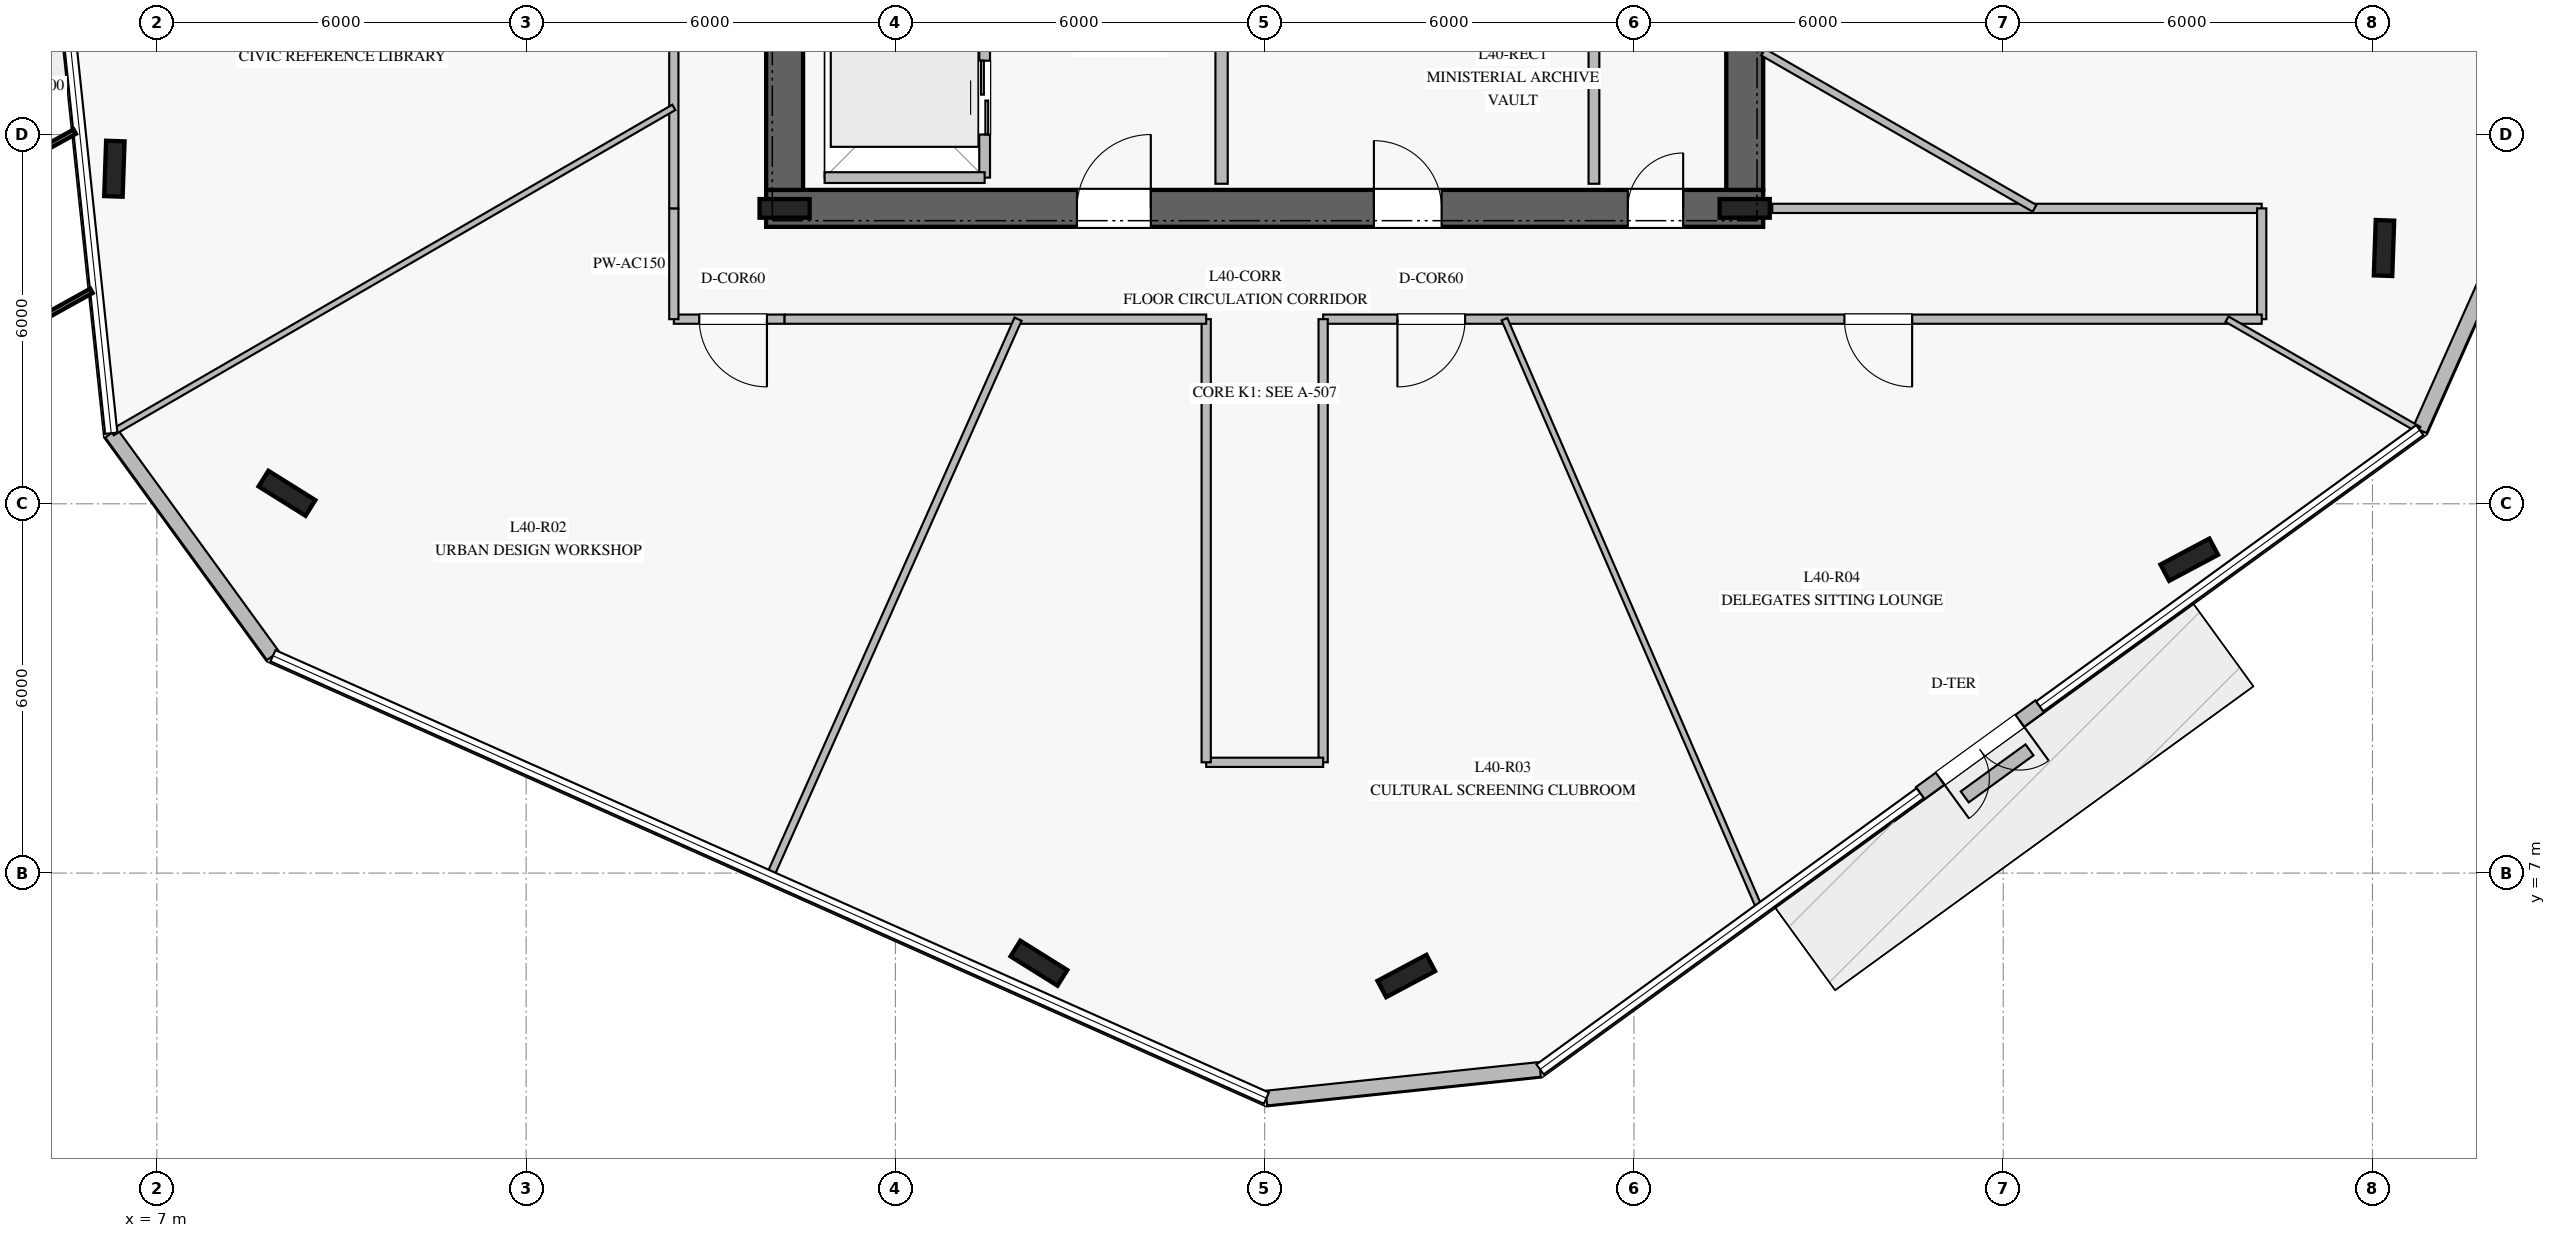
"""IFC4 building model, lengths in metres.
Left out: names, types, materials, properties, quantities, classifications, styles, units other than length and angle.
Written with IfcOpenShell. Run it as: python <this file> out.ifc"""

import sys

from ifc_helpers import new_model, si_unit, direction, frame, frame_2d, origin, origin_2d, place, context, subcontext, project, spatial, rectangle, i_section, extrude, element, fill, save


model = new_model("IFC4")
c1 = context("Model", 3, precision=1e-05, world=origin(), true_north=direction((0.0, 1.0)))
c2 = subcontext(c1, "Body", "Model", "MODEL_VIEW")
j1 = project(units=[si_unit("LENGTHUNIT", "METRE"), si_unit("PLANEANGLEUNIT", "RADIAN")], contexts=[c1])
p1 = place(None, origin())
s1 = spatial("IfcSite", under=j1, at=p1, CompositionType="ELEMENT")
p2 = place(p1, origin())
s2 = spatial("IfcBuilding", under=s1, at=p2, CompositionType="ELEMENT")
p3 = place(p2, frame((0.0, 0.0, 166.4)))
s3 = spatial("IfcBuildingStorey", under=s2, at=p3, CompositionType="ELEMENT", Elevation=166.4)
p4 = place(p3, frame((16.9, 17.8, 0.0), z_axis=(0.0, 0.0, 1.0), x_axis=(1.0, 0.0, 0.0)))
e1 = element("IfcWall", 1, at=p4, inside=s3, PredefinedType="SHEAR", context=c2, shape_type="SweptSolid", body=[
    extrude(rectangle(XDim=16.2, YDim=0.6, at=frame_2d((8.1, 0.0))), origin(), (0.0, 0.0, 1.0), 3.7),
])
p5 = place(p4, frame((5.05, 0.0, 0.0)))
e2 = element("IfcOpeningElement", 2, at=p5, cuts=e1, PredefinedType="OPENING", context=c2, shape_type="SweptSolid", body=[
    extrude(rectangle(XDim=1.2, YDim=2.25, at=frame_2d((0.6, 1.125))), frame((0.0, 0.31, 0.0), z_axis=(0.0, -1.0, 0.0), x_axis=(1.0, 0.0, 0.0)), (0.0, 0.0, 1.0), 0.62),
])
p6 = place(p4, frame((14.0, 0.0, 0.0)))
e3 = element("IfcOpeningElement", 3, at=p6, cuts=e1, PredefinedType="OPENING", context=c2, shape_type="SweptSolid", body=[
    extrude(rectangle(XDim=0.9, YDim=2.1, at=frame_2d((0.45, 1.05))), frame((0.0, 0.31, 0.0), z_axis=(0.0, -1.0, 0.0), x_axis=(1.0, 0.0, 0.0)), (0.0, 0.0, 1.0), 0.62),
])
p7 = place(p4, frame((9.875, 0.0, 0.0)))
e4 = element("IfcOpeningElement", 4, at=p7, cuts=e1, PredefinedType="OPENING", context=c2, shape_type="SweptSolid", body=[
    extrude(rectangle(XDim=1.1, YDim=2.2, at=frame_2d((0.55, 1.1))), frame((0.0, 0.31, 0.0), z_axis=(0.0, -1.0, 0.0), x_axis=(1.0, 0.0, 0.0)), (0.0, 0.0, 1.0), 0.62),
])
p8 = place(p3, frame((17.2, 31.9, 0.0), z_axis=(0.0, 0.0, 1.0), x_axis=(0.0, -1.0, 0.0)))
e5 = element("IfcWall", 5, at=p8, inside=s3, PredefinedType="SHEAR", context=c2, shape_type="SweptSolid", body=[
    extrude(rectangle(XDim=13.8, YDim=0.6, at=frame_2d((6.9, 0.0))), origin(), (0.0, 0.0, 1.0), 3.7),
])
p9 = place(p8, frame((2.05, 0.0, 0.0)))
e6 = element("IfcOpeningElement", 6, at=p9, cuts=e5, PredefinedType="OPENING", context=c2, shape_type="SweptSolid", body=[
    extrude(rectangle(XDim=1.5, YDim=2.2, at=frame_2d((0.75, 1.1))), frame((0.0, 0.31, 0.0), z_axis=(0.0, -1.0, 0.0), x_axis=(1.0, 0.0, 0.0)), (0.0, 0.0, 1.0), 0.62),
])
p10 = place(p3, frame((32.8, 18.1, 0.0), z_axis=(0.0, 0.0, 1.0), x_axis=(0.0, 1.0, 0.0)))
e7 = element("IfcWall", 7, at=p10, inside=s3, PredefinedType="SHEAR", context=c2, shape_type="SweptSolid", body=[
    extrude(rectangle(XDim=13.8, YDim=0.6, at=frame_2d((6.9, 0.0))), origin(), (0.0, 0.0, 1.0), 3.7),
])
for number, where, z_axis, x_axis in (
    (8, (17.2, 17.8, 0.0), (0.0, 0.0, 1.0), (1.0, 0.0, 0.0)),
    (9, (32.8, 17.8, 0.0), (0.0, 0.0, 1.0), (1.0, 0.0, 0.0)),
):
    element("IfcColumn", number, at=place(p3, frame(where, z_axis=z_axis, x_axis=x_axis)), inside=s3, PredefinedType="COLUMN", context=c2, shape_type="SweptSolid", body=[
        extrude(i_section(OverallWidth=0.303, OverallDepth=0.814, WebThickness=0.021, FlangeThickness=0.04, at=origin_2d()), origin(), (0.0, 0.0, 1.0), 4.0),
    ])
for number, where, z_axis, x_axis in (
    (10, (6.31, 18.444, 0.0), (0.0, 0.0, 1.0), (0.035, 0.999, 0.0)),
    (11, (9.114, 13.171, 0.0), (0.0, 0.0, 1.0), (-0.848, 0.53, 0.0)),
    (12, (21.332, 5.536, 0.0), (0.0, 0.0, 1.0), (-0.848, 0.53, 0.0)),
    (13, (27.301, 5.328, 0.0), (0.0, 0.0, 1.0), (0.883, 0.469, 0.0)),
    (14, (40.023, 12.092, 0.0), (0.0, 0.0, 1.0), (0.883, 0.469, 0.0)),
    (15, (43.187, 17.156, 0.0), (0.0, 0.0, 1.0), (0.035, 0.999, 0.0)),
):
    element("IfcColumn", number, at=place(p3, frame(where, z_axis=z_axis, x_axis=x_axis)), inside=s3, PredefinedType="COLUMN", context=c2, shape_type="SweptSolid", body=[
        extrude(i_section(OverallWidth=0.3, OverallDepth=0.9, WebThickness=0.019, FlangeThickness=0.035, at=origin_2d()), origin(), (0.0, 0.0, 1.0), 4.0),
    ])
p11 = place(p3, frame((6.259, 14.147, 0.0), z_axis=(0.0, 0.0, 1.0), x_axis=(0.587898873753, -0.80893443136, 0.0)))
e16 = element("IfcWall", 16, at=p11, inside=s3, PredefinedType="STANDARD", context=c2, shape_type="SweptSolid", body=[
    extrude(rectangle(XDim=4.47, YDim=0.24, at=frame_2d((2.235, 0.0))), origin(), (0.0, 0.0, 1.0), 3.7),
])
p12 = place(p3, frame((25.028, 3.344, 0.0), z_axis=(0.0, 0.0, 1.0), x_axis=(0.994530256506, 0.104448881729, 0.0)))
e17 = element("IfcWall", 17, at=p12, inside=s3, PredefinedType="STANDARD", context=c2, shape_type="SweptSolid", body=[
    extrude(rectangle(XDim=4.471, YDim=0.24, at=frame_2d((2.236, 0.0))), origin(), (0.0, 0.0, 1.0), 3.7),
])
p13 = place(p3, frame((35.651, 8.299, 0.0), z_axis=(0.0, 0.0, 1.0), x_axis=(0.809241672901, 0.587475884476, 0.0)))
e18 = element("IfcWall", 18, at=p13, inside=s3, PredefinedType="STANDARD", context=c2, shape_type="SweptSolid", body=[
    extrude(rectangle(XDim=2.4, YDim=0.24, at=frame_2d((1.2, 0.0))), origin(), (0.0, 0.0, 1.0), 3.7),
])
p14 = place(p13, frame((0.4, 0.0, 0.0)))
e19 = element("IfcOpeningElement", 19, at=p14, cuts=e18, PredefinedType="OPENING", context=c2, shape_type="SweptSolid", body=[
    extrude(rectangle(XDim=1.6, YDim=2.25, at=frame_2d((0.8, 1.125))), frame((0.0, 0.13, 0.0), z_axis=(0.0, -1.0, 0.0), x_axis=(1.0, 0.0, 0.0)), (0.0, 0.0, 1.0), 0.26),
])
p15 = place(p3, frame((43.769, 14.197, 0.0), z_axis=(0.0, 0.0, 1.0), x_axis=(0.406655262741, 0.913581686159, 0.0)))
e20 = element("IfcWall", 20, at=p15, inside=s3, PredefinedType="STANDARD", context=c2, shape_type="SweptSolid", body=[
    extrude(rectangle(XDim=4.47, YDim=0.24, at=frame_2d((2.235, 0.0))), origin(), (0.0, 0.0, 1.0), 3.7),
])
p16 = place(p3, frame((36.375, 8.238, 0.0), z_axis=(0.0, 0.0, 1.0), x_axis=(0.809166251076, 0.587579763197, 0.0)))
e21 = element("IfcWall", 21, at=p16, inside=s3, PredefinedType="USERDEFINED", context=c2, shape_type="SweptSolid", body=[
    extrude(rectangle(XDim=1.3, YDim=0.22, at=frame_2d((0.65, 0.0))), origin(), (0.0, 0.0, 1.0), 0.4),
])
p17 = place(p3, frame((24.3, 18.2, 0.0), z_axis=(0.0, 0.0, 1.0), x_axis=(0.0, 1.0, 0.0)))
e22 = element("IfcWall", 22, at=p17, inside=s3, PredefinedType="PARTITIONING", context=c2, shape_type="SweptSolid", body=[
    extrude(rectangle(XDim=5.15, YDim=0.2, at=frame_2d((2.575, 0.0))), origin(), (0.0, 0.0, 1.0), 3.7),
])
p18 = place(p3, frame((30.35, 18.2, 0.0), z_axis=(0.0, 0.0, 1.0), x_axis=(0.0, 1.0, 0.0)))
e23 = element("IfcWall", 23, at=p18, inside=s3, PredefinedType="PARTITIONING", context=c2, shape_type="SweptSolid", body=[
    extrude(rectangle(XDim=3.48, YDim=0.175, at=frame_2d((1.74, 0.0))), origin(), (0.0, 0.0, 1.0), 3.7),
])
p19 = place(p3, frame((20.45, 18.3, 0.0), z_axis=(0.0, 0.0, 1.0), x_axis=(0.0, 1.0, 0.0)))
e24 = element("IfcWall", 24, at=p19, inside=s3, PredefinedType="PARTITIONING", context=c2, shape_type="SweptSolid", body=[
    extrude(rectangle(XDim=2.6, YDim=0.175, at=frame_2d((1.3, 0.0))), origin(), (0.0, 0.0, 1.0), 3.7),
])
p20 = place(p19, frame((0.7, 0.0, 0.0)))
e25 = element("IfcOpeningElement", 25, at=p20, cuts=e24, PredefinedType="OPENING", context=c2, shape_type="SweptSolid", body=[
    extrude(rectangle(XDim=1.2, YDim=2.2, at=frame_2d((0.6, 1.1))), frame((0.0, 0.098, 0.0), z_axis=(0.0, -1.0, 0.0), x_axis=(1.0, 0.0, 0.0)), (0.0, 0.0, 1.0), 0.195),
])
p21 = place(p3, frame((17.85, 18.3, 0.0), z_axis=(0.0, 0.0, 1.0), x_axis=(1.0, 0.0, 0.0)))
e26 = element("IfcWall", 26, at=p21, inside=s3, PredefinedType="PARTITIONING", context=c2, shape_type="SweptSolid", body=[
    extrude(rectangle(XDim=2.6, YDim=0.175, at=frame_2d((1.3, 0.0))), origin(), (0.0, 0.0, 1.0), 3.7),
])
p22 = place(p3, frame((17.2, 16.0, 0.0), z_axis=(0.0, 0.0, 1.0), x_axis=(-1.0, 0.0, 0.0)))
e27 = element("IfcWall", 27, at=p22, inside=s3, PredefinedType="PARTITIONING", context=c2, shape_type="SweptSolid", body=[
    extrude(rectangle(XDim=1.8, YDim=0.15, at=frame_2d((0.9, 0.0))), origin(), (0.0, 0.0, 1.0), 3.3),
])
p23 = place(p22, frame((0.287, 0.0, 0.0)))
e28 = element("IfcOpeningElement", 28, at=p23, cuts=e27, PredefinedType="OPENING", context=c2, shape_type="SweptSolid", body=[
    extrude(rectangle(XDim=1.1, YDim=2.2, at=frame_2d((0.55, 1.1))), frame((0.0, 0.085, 0.0), z_axis=(0.0, -1.0, 0.0), x_axis=(1.0, 0.0, 0.0)), (0.0, 0.0, 1.0), 0.17),
])
p24 = place(p3, frame((15.4, 16.0, 0.0), z_axis=(0.0, 0.0, 1.0), x_axis=(0.0, 1.0, 0.0)))
e29 = element("IfcWall", 29, at=p24, inside=s3, PredefinedType="PARTITIONING", context=c2, shape_type="SweptSolid", body=[
    extrude(rectangle(XDim=1.8, YDim=0.15, at=frame_2d((0.9, 0.0))), origin(), (0.0, 0.0, 1.0), 3.15),
])
p25 = place(p3, frame((15.4, 17.8, 0.0), z_axis=(0.0, 0.0, 1.0), x_axis=(0.0, 1.0, 0.0)))
e30 = element("IfcWall", 30, at=p25, inside=s3, PredefinedType="PARTITIONING", context=c2, shape_type="SweptSolid", body=[
    extrude(rectangle(XDim=6.25, YDim=0.15, at=frame_2d((3.125, 0.0))), origin(), (0.0, 0.0, 1.0), 3.15),
])
p26 = place(p25, frame((3.191, 0.0, 0.0)))
e31 = element("IfcOpeningElement", 31, at=p26, cuts=e30, PredefinedType="OPENING", context=c2, shape_type="SweptSolid", body=[
    extrude(rectangle(XDim=1.1, YDim=2.2, at=frame_2d((0.55, 1.1))), frame((0.0, 0.085, 0.0), z_axis=(0.0, -1.0, 0.0), x_axis=(1.0, 0.0, 0.0)), (0.0, 0.0, 1.0), 0.17),
])
p27 = place(p3, frame((33.247, 17.8, 0.0), z_axis=(0.0, 0.0, 1.0), x_axis=(1.0, 0.0, 0.0)))
e32 = element("IfcWall", 32, at=p27, inside=s3, PredefinedType="PARTITIONING", context=c2, shape_type="SweptSolid", body=[
    extrude(rectangle(XDim=7.953, YDim=0.15, at=frame_2d((3.977, 0.0))), origin(), (0.0, 0.0, 1.0), 3.15),
])
p28 = place(p3, frame((41.2, 17.8, 0.0), z_axis=(0.0, 0.0, 1.0), x_axis=(0.0, -1.0, 0.0)))
e33 = element("IfcWall", 33, at=p28, inside=s3, PredefinedType="PARTITIONING", context=c2, shape_type="SweptSolid", body=[
    extrude(rectangle(XDim=1.8, YDim=0.15, at=frame_2d((0.9, 0.0))), origin(), (0.0, 0.0, 1.0), 3.15),
])
p29 = place(p3, frame((41.2, 16.0, 0.0), z_axis=(0.0, 0.0, 1.0), x_axis=(-1.0, 0.0, 0.0)))
e34 = element("IfcWall", 34, at=p29, inside=s3, PredefinedType="PARTITIONING", context=c2, shape_type="SweptSolid", body=[
    extrude(rectangle(XDim=15.25, YDim=0.15, at=frame_2d((7.625, 0.0))), origin(), (0.0, 0.0, 1.0), 3.15),
])
p30 = place(p29, frame((12.943, 0.0, 0.0)))
e35 = element("IfcOpeningElement", 35, at=p30, cuts=e34, PredefinedType="OPENING", context=c2, shape_type="SweptSolid", body=[
    extrude(rectangle(XDim=1.1, YDim=2.2, at=frame_2d((0.55, 1.1))), frame((0.0, 0.085, 0.0), z_axis=(0.0, -1.0, 0.0), x_axis=(1.0, 0.0, 0.0)), (0.0, 0.0, 1.0), 0.17),
])
p31 = place(p29, frame((5.68, 0.0, 0.0)))
e36 = element("IfcOpeningElement", 36, at=p31, cuts=e34, PredefinedType="OPENING", context=c2, shape_type="SweptSolid", body=[
    extrude(rectangle(XDim=1.1, YDim=2.2, at=frame_2d((0.55, 1.1))), frame((0.0, 0.085, 0.0), z_axis=(0.0, -1.0, 0.0), x_axis=(1.0, 0.0, 0.0)), (0.0, 0.0, 1.0), 0.17),
])
p32 = place(p3, frame((25.95, 16.0, 0.0), z_axis=(0.0, 0.0, 1.0), x_axis=(0.0, -1.0, 0.0)))
e37 = element("IfcWall", 37, at=p32, inside=s3, PredefinedType="PARTITIONING", context=c2, shape_type="SweptSolid", body=[
    extrude(rectangle(XDim=7.2, YDim=0.15, at=frame_2d((3.6, 0.0))), origin(), (0.0, 0.0, 1.0), 3.3),
])
p33 = place(p3, frame((25.95, 8.8, 0.0), z_axis=(0.0, 0.0, 1.0), x_axis=(-1.0, 0.0, 0.0)))
e38 = element("IfcWall", 38, at=p33, inside=s3, PredefinedType="PARTITIONING", context=c2, shape_type="SweptSolid", body=[
    extrude(rectangle(XDim=1.9, YDim=0.15, at=frame_2d((0.95, 0.0))), origin(), (0.0, 0.0, 1.0), 3.7),
])
p34 = place(p3, frame((24.05, 8.8, 0.0), z_axis=(0.0, 0.0, 1.0), x_axis=(0.0, 1.0, 0.0)))
e39 = element("IfcWall", 39, at=p34, inside=s3, PredefinedType="PARTITIONING", context=c2, shape_type="SweptSolid", body=[
    extrude(rectangle(XDim=7.2, YDim=0.15, at=frame_2d((3.6, 0.0))), origin(), (0.0, 0.0, 1.0), 3.3),
])
p35 = place(p3, frame((24.05, 16.0, 0.0), z_axis=(0.0, 0.0, 1.0), x_axis=(-1.0, 0.0, 0.0)))
e40 = element("IfcWall", 40, at=p35, inside=s3, PredefinedType="PARTITIONING", context=c2, shape_type="SweptSolid", body=[
    extrude(rectangle(XDim=6.85, YDim=0.15, at=frame_2d((3.425, 0.0))), origin(), (0.0, 0.0, 1.0), 3.15),
])
p36 = place(p3, frame((15.4, 19.441, 0.0), z_axis=(0.0, 0.0, 1.0), x_axis=(-0.86538348206, -0.501110196442, 0.0)))
e41 = element("IfcWall", 41, at=p36, inside=s3, PredefinedType="MOVABLE", context=c2, shape_type="SweptSolid", body=[
    extrude(rectangle(XDim=10.544, YDim=0.1, at=frame_2d((5.272, 0.0))), origin(), (0.0, 0.0, 1.0), 3.1),
])
p37 = place(p3, frame((20.993, 16.0, 0.0), z_axis=(0.0, 0.0, 1.0), x_axis=(-0.406801666568, -0.913516504546, 0.0)))
e42 = element("IfcWall", 42, at=p37, inside=s3, PredefinedType="PARTITIONING", context=c2, shape_type="SweptSolid", body=[
    extrude(rectangle(XDim=9.904, YDim=0.125, at=frame_2d((4.952, 0.0))), origin(), (0.0, 0.0, 1.0), 3.1),
])
p38 = place(p3, frame((28.896, 16.0, 0.0), z_axis=(0.0, 0.0, 1.0), x_axis=(0.397240358387, -0.917714605784, 0.0)))
e43 = element("IfcWall", 43, at=p38, inside=s3, PredefinedType="MOVABLE", context=c2, shape_type="SweptSolid", body=[
    extrude(rectangle(XDim=10.435, YDim=0.1, at=frame_2d((5.217, 0.0))), origin(), (0.0, 0.0, 1.0), 3.1),
])
p39 = place(p3, frame((33.1, 20.338, 0.0), z_axis=(0.0, 0.0, 1.0), x_axis=(0.866676533117, -0.498870511199, 0.0)))
e44 = element("IfcWall", 44, at=p39, inside=s3, PredefinedType="PARTITIONING", context=c2, shape_type="SweptSolid", body=[
    extrude(rectangle(XDim=5.087, YDim=0.125, at=frame_2d((2.543, 0.0))), origin(), (0.0, 0.0, 1.0), 3.3),
])
p40 = place(p3, frame((40.636, 16.0, 0.0), z_axis=(0.0, 0.0, 1.0), x_axis=(0.866634023406, -0.498944355088, 0.0)))
e45 = element("IfcWall", 45, at=p40, inside=s3, PredefinedType="MOVABLE", context=c2, shape_type="SweptSolid", body=[
    extrude(rectangle(XDim=3.595, YDim=0.1, at=frame_2d((1.798, 0.0))), origin(), (0.0, 0.0, 1.0), 3.1),
])
p41 = place(p14, frame((1.6, 0.0, 0.0), z_axis=(0.0, 0.0, 1.0), x_axis=(-1.0, 0.0, 0.0)))
e46 = element("IfcDoor", 46, at=p41, inside=s3, OperationType="DOUBLE_DOOR_SINGLE_SWING", PredefinedType="DOOR", context=c2, shape_type="SweptSolid", body=[
    extrude(rectangle(XDim=1.6, YDim=2.25, at=frame_2d((0.8, 1.125))), frame((0.0, 0.025, 0.0), z_axis=(0.0, -1.0, 0.0), x_axis=(1.0, 0.0, 0.0)), (0.0, 0.0, 1.0), 0.05),
])
fill(e19, e46)
p42 = place(p5, origin())
e47 = element("IfcDoor", 47, at=p42, inside=s3, OperationType="SINGLE_SWING_RIGHT", PredefinedType="DOOR", context=c2, shape_type="SweptSolid", body=[
    extrude(rectangle(XDim=1.2, YDim=2.25, at=frame_2d((0.6, 1.125))), frame((0.0, 0.025, 0.0), z_axis=(0.0, -1.0, 0.0), x_axis=(1.0, 0.0, 0.0)), (0.0, 0.0, 1.0), 0.05),
])
fill(e2, e47)
p43 = place(p6, origin())
e48 = element("IfcDoor", 48, at=p43, inside=s3, OperationType="SINGLE_SWING_RIGHT", PredefinedType="DOOR", context=c2, shape_type="SweptSolid", body=[
    extrude(rectangle(XDim=0.9, YDim=2.1, at=frame_2d((0.45, 1.05))), frame((0.0, 0.025, 0.0), z_axis=(0.0, -1.0, 0.0), x_axis=(1.0, 0.0, 0.0)), (0.0, 0.0, 1.0), 0.05),
])
fill(e3, e48)
p44 = place(p7, origin())
e49 = element("IfcDoor", 49, at=p44, inside=s3, OperationType="SINGLE_SWING_LEFT", PredefinedType="DOOR", context=c2, shape_type="SweptSolid", body=[
    extrude(rectangle(XDim=1.1, YDim=2.2, at=frame_2d((0.55, 1.1))), frame((0.0, 0.025, 0.0), z_axis=(0.0, -1.0, 0.0), x_axis=(1.0, 0.0, 0.0)), (0.0, 0.0, 1.0), 0.05),
])
fill(e4, e49)
p45 = place(p20, origin())
e50 = element("IfcDoor", 50, at=p45, inside=s3, OperationType="DOUBLE_DOOR_SLIDING", PredefinedType="DOOR", context=c2, shape_type="SweptSolid", body=[
    extrude(rectangle(XDim=1.2, YDim=2.2, at=frame_2d((0.6, 1.1))), frame((0.0, 0.025, 0.0), z_axis=(0.0, -1.0, 0.0), x_axis=(1.0, 0.0, 0.0)), (0.0, 0.0, 1.0), 0.05),
])
fill(e25, e50)
p46 = place(p23, origin())
e51 = element("IfcDoor", 51, at=p46, inside=s3, OperationType="SINGLE_SWING_LEFT", PredefinedType="DOOR", context=c2, shape_type="SweptSolid", body=[
    extrude(rectangle(XDim=1.1, YDim=2.2, at=frame_2d((0.55, 1.1))), frame((0.0, 0.025, 0.0), z_axis=(0.0, -1.0, 0.0), x_axis=(1.0, 0.0, 0.0)), (0.0, 0.0, 1.0), 0.05),
])
fill(e28, e51)
p47 = place(p30, origin())
e52 = element("IfcDoor", 52, at=p47, inside=s3, OperationType="SINGLE_SWING_RIGHT", PredefinedType="DOOR", context=c2, shape_type="SweptSolid", body=[
    extrude(rectangle(XDim=1.1, YDim=2.2, at=frame_2d((0.55, 1.1))), frame((0.0, 0.025, 0.0), z_axis=(0.0, -1.0, 0.0), x_axis=(1.0, 0.0, 0.0)), (0.0, 0.0, 1.0), 0.05),
])
fill(e35, e52)
p48 = place(p31, origin())
e53 = element("IfcDoor", 53, at=p48, inside=s3, OperationType="SINGLE_SWING_LEFT", PredefinedType="DOOR", context=c2, shape_type="SweptSolid", body=[
    extrude(rectangle(XDim=1.1, YDim=2.2, at=frame_2d((0.55, 1.1))), frame((0.0, 0.025, 0.0), z_axis=(0.0, -1.0, 0.0), x_axis=(1.0, 0.0, 0.0)), (0.0, 0.0, 1.0), 0.05),
])
fill(e36, e53)
save(model, sys.argv[1])
